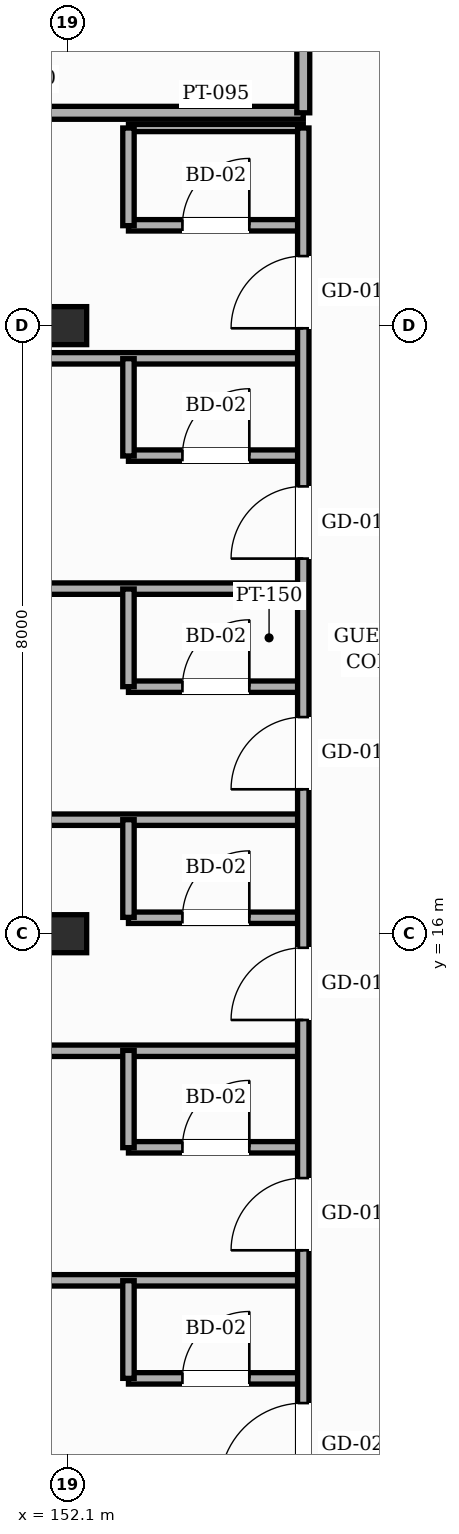
"""IFC4 building model, lengths in metres.
Left out: names, types, materials, properties, quantities, classifications, styles, units other than length and angle.
Written with IfcOpenShell. Run it as: python <this file> out.ifc"""

import sys

from ifc_helpers import new_model, si_unit, direction, frame, frame_2d, origin, origin_2d, place, context, subcontext, project, spatial, rectangle, hollow_rectangle, extrude, element, fill, save


model = new_model("IFC4")
c1 = context("Model", 3, precision=1e-05, world=origin(), true_north=direction((0.0, 1.0)))
c2 = subcontext(c1, "Body", "Model", "MODEL_VIEW")
j1 = project(units=[si_unit("LENGTHUNIT", "METRE"), si_unit("PLANEANGLEUNIT", "RADIAN")], contexts=[c1])
p1 = place(None, origin())
s1 = spatial("IfcSite", under=j1, at=p1, CompositionType="ELEMENT")
p2 = place(p1, origin())
s2 = spatial("IfcBuilding", under=s1, at=p2, CompositionType="ELEMENT")
p3 = place(p2, frame((0.0, 0.0, 39.0)))
s3 = spatial("IfcBuildingStorey", under=s2, at=p3, CompositionType="ELEMENT", Elevation=39.0)
for number, where, z_axis, x_axis in (
    (1, (152.1, 16.0, 0.0), (0.0, 0.0, 1.0), (1.0, 0.0, 0.0)),
    (2, (152.1, 24.0, 0.0), (0.0, 0.0, 1.0), (1.0, 0.0, 0.0)),
):
    element("IfcColumn", number, at=place(p3, frame(where, z_axis=z_axis, x_axis=x_axis)), inside=s3, PredefinedType="COLUMN", context=c2, shape_type="SweptSolid", body=[
        extrude(hollow_rectangle(XDim=0.5, YDim=0.5, WallThickness=0.022, InnerFilletRadius=0.022, OuterFilletRadius=0.044, at=origin_2d()), origin(), (0.0, 0.0, 1.0), 3.6),
    ])
p4 = place(p3, frame((152.9, 10.15, 0.0), z_axis=(0.0, 0.0, 1.0), x_axis=(1.0, 0.0, 0.0)))
e3 = element("IfcWall", 3, at=p4, inside=s3, PredefinedType="PARTITIONING", context=c2, shape_type="SweptSolid", body=[
    extrude(rectangle(XDim=2.3, YDim=0.15, at=frame_2d((1.15, 0.0))), origin(), (0.0, 0.0, 1.0), 3.365),
])
p5 = place(p4, frame((0.71, 0.0, 0.0)))
e4 = element("IfcOpeningElement", 4, at=p5, cuts=e3, PredefinedType="OPENING", context=c2, shape_type="SweptSolid", body=[
    extrude(rectangle(XDim=0.88, YDim=2.12, at=frame_2d((0.44, 1.06))), frame((0.0, 0.085, 0.0), z_axis=(0.0, -1.0, 0.0), x_axis=(1.0, 0.0, 0.0)), (0.0, 0.0, 1.0), 0.17),
])
p6 = place(p3, frame((144.2, 11.44, 0.0), z_axis=(0.0, 0.0, 1.0), x_axis=(1.0, 0.0, 0.0)))
e5 = element("IfcWall", 5, at=p6, inside=s3, PredefinedType="PARTITIONING", context=c2, shape_type="SweptSolid", body=[
    extrude(rectangle(XDim=11.0, YDim=0.15, at=frame_2d((5.5, 0.0))), origin(), (0.0, 0.0, 1.0), 3.365),
])
p7 = place(p3, frame((152.9, 13.19, 0.0), z_axis=(0.0, 0.0, 1.0), x_axis=(1.0, 0.0, 0.0)))
e6 = element("IfcWall", 6, at=p7, inside=s3, PredefinedType="PARTITIONING", context=c2, shape_type="SweptSolid", body=[
    extrude(rectangle(XDim=2.3, YDim=0.15, at=frame_2d((1.15, 0.0))), origin(), (0.0, 0.0, 1.0), 3.365),
])
p8 = place(p7, frame((0.71, 0.0, 0.0)))
e7 = element("IfcOpeningElement", 7, at=p8, cuts=e6, PredefinedType="OPENING", context=c2, shape_type="SweptSolid", body=[
    extrude(rectangle(XDim=0.88, YDim=2.12, at=frame_2d((0.44, 1.06))), frame((0.0, 0.085, 0.0), z_axis=(0.0, -1.0, 0.0), x_axis=(1.0, 0.0, 0.0)), (0.0, 0.0, 1.0), 0.17),
])
p9 = place(p3, frame((144.2, 14.46, 0.0), z_axis=(0.0, 0.0, 1.0), x_axis=(1.0, 0.0, 0.0)))
e8 = element("IfcWall", 8, at=p9, inside=s3, PredefinedType="PARTITIONING", context=c2, shape_type="SweptSolid", body=[
    extrude(rectangle(XDim=11.0, YDim=0.15, at=frame_2d((5.5, 0.0))), origin(), (0.0, 0.0, 1.0), 3.365),
])
p10 = place(p3, frame((152.9, 16.21, 0.0), z_axis=(0.0, 0.0, 1.0), x_axis=(1.0, 0.0, 0.0)))
e9 = element("IfcWall", 9, at=p10, inside=s3, PredefinedType="PARTITIONING", context=c2, shape_type="SweptSolid", body=[
    extrude(rectangle(XDim=2.3, YDim=0.15, at=frame_2d((1.15, 0.0))), origin(), (0.0, 0.0, 1.0), 2.755),
])
p11 = place(p10, frame((0.71, 0.0, 0.0)))
e10 = element("IfcOpeningElement", 10, at=p11, cuts=e9, PredefinedType="OPENING", context=c2, shape_type="SweptSolid", body=[
    extrude(rectangle(XDim=0.88, YDim=2.12, at=frame_2d((0.44, 1.06))), frame((0.0, 0.085, 0.0), z_axis=(0.0, -1.0, 0.0), x_axis=(1.0, 0.0, 0.0)), (0.0, 0.0, 1.0), 0.17),
])
p12 = place(p3, frame((144.2, 17.5, 0.0), z_axis=(0.0, 0.0, 1.0), x_axis=(1.0, 0.0, 0.0)))
e11 = element("IfcWall", 11, at=p12, inside=s3, PredefinedType="PARTITIONING", context=c2, shape_type="SweptSolid", body=[
    extrude(rectangle(XDim=11.0, YDim=0.15, at=frame_2d((5.5, 0.0))), origin(), (0.0, 0.0, 1.0), 3.365),
])
p13 = place(p3, frame((152.9, 19.25, 0.0), z_axis=(0.0, 0.0, 1.0), x_axis=(1.0, 0.0, 0.0)))
e12 = element("IfcWall", 12, at=p13, inside=s3, PredefinedType="PARTITIONING", context=c2, shape_type="SweptSolid", body=[
    extrude(rectangle(XDim=2.3, YDim=0.15, at=frame_2d((1.15, 0.0))), origin(), (0.0, 0.0, 1.0), 3.365),
])
p14 = place(p13, frame((0.71, 0.0, 0.0)))
e13 = element("IfcOpeningElement", 13, at=p14, cuts=e12, PredefinedType="OPENING", context=c2, shape_type="SweptSolid", body=[
    extrude(rectangle(XDim=0.88, YDim=2.12, at=frame_2d((0.44, 1.06))), frame((0.0, 0.085, 0.0), z_axis=(0.0, -1.0, 0.0), x_axis=(1.0, 0.0, 0.0)), (0.0, 0.0, 1.0), 0.17),
])
p15 = place(p3, frame((144.2, 20.54, 0.0), z_axis=(0.0, 0.0, 1.0), x_axis=(1.0, 0.0, 0.0)))
e14 = element("IfcWall", 14, at=p15, inside=s3, PredefinedType="PARTITIONING", context=c2, shape_type="SweptSolid", body=[
    extrude(rectangle(XDim=11.0, YDim=0.15, at=frame_2d((5.5, 0.0))), origin(), (0.0, 0.0, 1.0), 3.365),
])
p16 = place(p3, frame((152.9, 22.29, 0.0), z_axis=(0.0, 0.0, 1.0), x_axis=(1.0, 0.0, 0.0)))
e15 = element("IfcWall", 15, at=p16, inside=s3, PredefinedType="PARTITIONING", context=c2, shape_type="SweptSolid", body=[
    extrude(rectangle(XDim=2.3, YDim=0.15, at=frame_2d((1.15, 0.0))), origin(), (0.0, 0.0, 1.0), 3.365),
])
p17 = place(p16, frame((0.71, 0.0, 0.0)))
e16 = element("IfcOpeningElement", 16, at=p17, cuts=e15, PredefinedType="OPENING", context=c2, shape_type="SweptSolid", body=[
    extrude(rectangle(XDim=0.88, YDim=2.12, at=frame_2d((0.44, 1.06))), frame((0.0, 0.085, 0.0), z_axis=(0.0, -1.0, 0.0), x_axis=(1.0, 0.0, 0.0)), (0.0, 0.0, 1.0), 0.17),
])
p18 = place(p3, frame((144.2, 23.57, 0.0), z_axis=(0.0, 0.0, 1.0), x_axis=(1.0, 0.0, 0.0)))
e17 = element("IfcWall", 17, at=p18, inside=s3, PredefinedType="PARTITIONING", context=c2, shape_type="SweptSolid", body=[
    extrude(rectangle(XDim=11.0, YDim=0.15, at=frame_2d((5.5, 0.0))), origin(), (0.0, 0.0, 1.0), 3.365),
])
p19 = place(p3, frame((152.9, 25.32, 0.0), z_axis=(0.0, 0.0, 1.0), x_axis=(1.0, 0.0, 0.0)))
e18 = element("IfcWall", 18, at=p19, inside=s3, PredefinedType="PARTITIONING", context=c2, shape_type="SweptSolid", body=[
    extrude(rectangle(XDim=2.3, YDim=0.15, at=frame_2d((1.15, 0.0))), origin(), (0.0, 0.0, 1.0), 3.365),
])
p20 = place(p19, frame((0.71, 0.0, 0.0)))
e19 = element("IfcOpeningElement", 19, at=p20, cuts=e18, PredefinedType="OPENING", context=c2, shape_type="SweptSolid", body=[
    extrude(rectangle(XDim=0.88, YDim=2.12, at=frame_2d((0.44, 1.06))), frame((0.0, 0.085, 0.0), z_axis=(0.0, -1.0, 0.0), x_axis=(1.0, 0.0, 0.0)), (0.0, 0.0, 1.0), 0.17),
])
p21 = place(p3, frame((152.9, 26.6, 0.0), z_axis=(0.0, 0.0, 1.0), x_axis=(1.0, 0.0, 0.0)))
e20 = element("IfcWall", 20, at=p21, inside=s3, PredefinedType="PARTITIONING", context=c2, shape_type="SweptSolid", body=[
    extrude(rectangle(XDim=2.3, YDim=0.095, at=frame_2d((1.15, 0.0))), origin(), (0.0, 0.0, 1.0), 3.365),
])
p22 = place(p3, frame((147.8, 26.8, 0.0), z_axis=(0.0, 0.0, 1.0), x_axis=(1.0, 0.0, 0.0)))
e21 = element("IfcWall", 21, at=p22, inside=s3, PredefinedType="PARTITIONING", context=c2, shape_type="SweptSolid", body=[
    extrude(rectangle(XDim=7.4, YDim=0.17, at=frame_2d((3.7, 0.0))), origin(), (0.0, 0.0, 1.0), 3.365),
])
p23 = place(p3, frame((152.9, 10.15, 0.0), z_axis=(0.0, 0.0, 1.0), x_axis=(0.0, 1.0, 0.0)))
e22 = element("IfcWall", 22, at=p23, inside=s3, PredefinedType="PARTITIONING", context=c2, shape_type="SweptSolid", body=[
    extrude(rectangle(XDim=1.285, YDim=0.15, at=frame_2d((0.643, 0.0))), origin(), (0.0, 0.0, 1.0), 3.365),
])
p24 = place(p3, frame((152.9, 13.185, 0.0), z_axis=(0.0, 0.0, 1.0), x_axis=(0.0, 1.0, 0.0)))
e23 = element("IfcWall", 23, at=p24, inside=s3, PredefinedType="PARTITIONING", context=c2, shape_type="SweptSolid", body=[
    extrude(rectangle(XDim=1.28, YDim=0.15, at=frame_2d((0.64, 0.0))), origin(), (0.0, 0.0, 1.0), 3.365),
])
for number, where, z_axis, x_axis in (
    (24, (152.9, 16.215, 0.0), (0.0, 0.0, 1.0), (0.0, 1.0, 0.0)),
    (25, (152.9, 19.25, 0.0), (0.0, 0.0, 1.0), (0.0, 1.0, 0.0)),
):
    element("IfcWall", number, at=place(p3, frame(where, z_axis=z_axis, x_axis=x_axis)), inside=s3, PredefinedType="PARTITIONING", context=c2, shape_type="SweptSolid", body=[
        extrude(rectangle(XDim=1.285, YDim=0.15, at=frame_2d((0.643, 0.0))), origin(), (0.0, 0.0, 1.0), 3.365),
    ])
p25 = place(p3, frame((152.9, 22.285, 0.0), z_axis=(0.0, 0.0, 1.0), x_axis=(0.0, 1.0, 0.0)))
e26 = element("IfcWall", 26, at=p25, inside=s3, PredefinedType="PARTITIONING", context=c2, shape_type="SweptSolid", body=[
    extrude(rectangle(XDim=1.28, YDim=0.15, at=frame_2d((0.64, 0.0))), origin(), (0.0, 0.0, 1.0), 3.365),
])
p26 = place(p3, frame((152.9, 25.315, 0.0), z_axis=(0.0, 0.0, 1.0), x_axis=(0.0, 1.0, 0.0)))
e27 = element("IfcWall", 27, at=p26, inside=s3, PredefinedType="PARTITIONING", context=c2, shape_type="SweptSolid", body=[
    extrude(rectangle(XDim=1.285, YDim=0.15, at=frame_2d((0.643, 0.0))), origin(), (0.0, 0.0, 1.0), 3.365),
])
p27 = place(p3, frame((155.2, 8.4, 0.0), z_axis=(0.0, 0.0, 1.0), x_axis=(0.0, 1.0, 0.0)))
e28 = element("IfcWall", 28, at=p27, inside=s3, PredefinedType="PARTITIONING", context=c2, shape_type="SweptSolid", body=[
    extrude(rectangle(XDim=18.2, YDim=0.15, at=frame_2d((9.1, 0.0))), origin(), (0.0, 0.0, 1.0), 3.365),
])
p28 = place(p27, frame((0.325, 0.0, 0.0)))
e29 = element("IfcOpeningElement", 29, at=p28, cuts=e28, PredefinedType="OPENING", context=c2, shape_type="SweptSolid", body=[
    extrude(rectangle(XDim=1.1, YDim=2.2, at=frame_2d((0.55, 1.1))), frame((0.0, 0.085, 0.0), z_axis=(0.0, -1.0, 0.0), x_axis=(1.0, 0.0, 0.0)), (0.0, 0.0, 1.0), 0.17),
])
p29 = place(p27, frame((3.435, 0.0, 0.0)))
e30 = element("IfcOpeningElement", 30, at=p29, cuts=e28, PredefinedType="OPENING", context=c2, shape_type="SweptSolid", body=[
    extrude(rectangle(XDim=0.95, YDim=2.15, at=frame_2d((0.475, 1.075))), frame((0.0, 0.085, 0.0), z_axis=(0.0, -1.0, 0.0), x_axis=(1.0, 0.0, 0.0)), (0.0, 0.0, 1.0), 0.17),
])
p30 = place(p27, frame((6.465, 0.0, 0.0)))
e31 = element("IfcOpeningElement", 31, at=p30, cuts=e28, PredefinedType="OPENING", context=c2, shape_type="SweptSolid", body=[
    extrude(rectangle(XDim=0.95, YDim=2.15, at=frame_2d((0.475, 1.075))), frame((0.0, 0.085, 0.0), z_axis=(0.0, -1.0, 0.0), x_axis=(1.0, 0.0, 0.0)), (0.0, 0.0, 1.0), 0.17),
])
p31 = place(p27, frame((9.5, 0.0, 0.0)))
e32 = element("IfcOpeningElement", 32, at=p31, cuts=e28, PredefinedType="OPENING", context=c2, shape_type="SweptSolid", body=[
    extrude(rectangle(XDim=0.95, YDim=2.15, at=frame_2d((0.475, 1.075))), frame((0.0, 0.085, 0.0), z_axis=(0.0, -1.0, 0.0), x_axis=(1.0, 0.0, 0.0)), (0.0, 0.0, 1.0), 0.17),
])
p32 = place(p27, frame((12.535, 0.0, 0.0)))
e33 = element("IfcOpeningElement", 33, at=p32, cuts=e28, PredefinedType="OPENING", context=c2, shape_type="SweptSolid", body=[
    extrude(rectangle(XDim=0.95, YDim=2.15, at=frame_2d((0.475, 1.075))), frame((0.0, 0.085, 0.0), z_axis=(0.0, -1.0, 0.0), x_axis=(1.0, 0.0, 0.0)), (0.0, 0.0, 1.0), 0.17),
])
p33 = place(p27, frame((15.565, 0.0, 0.0)))
e34 = element("IfcOpeningElement", 34, at=p33, cuts=e28, PredefinedType="OPENING", context=c2, shape_type="SweptSolid", body=[
    extrude(rectangle(XDim=0.95, YDim=2.15, at=frame_2d((0.475, 1.075))), frame((0.0, 0.085, 0.0), z_axis=(0.0, -1.0, 0.0), x_axis=(1.0, 0.0, 0.0)), (0.0, 0.0, 1.0), 0.17),
])
p34 = place(p3, frame((155.2, 26.8, 0.0), z_axis=(0.0, 0.0, 1.0), x_axis=(0.0, 1.0, 0.0)))
e35 = element("IfcWall", 35, at=p34, inside=s3, PredefinedType="PARTITIONING", context=c2, shape_type="SweptSolid", body=[
    extrude(rectangle(XDim=3.4, YDim=0.17, at=frame_2d((1.7, 0.0))), origin(), (0.0, 0.0, 1.0), 3.365),
])
p35 = place(p34, frame((1.1, 0.0, 0.0)))
e36 = element("IfcOpeningElement", 36, at=p35, cuts=e35, PredefinedType="OPENING", context=c2, shape_type="SweptSolid", body=[
    extrude(rectangle(XDim=1.2, YDim=2.2, at=frame_2d((0.6, 1.1))), frame((0.0, 0.095, 0.0), z_axis=(0.0, -1.0, 0.0), x_axis=(1.0, 0.0, 0.0)), (0.0, 0.0, 1.0), 0.19),
])
p36 = place(p28, origin())
e37 = element("IfcDoor", 37, at=p36, inside=s3, OperationType="SINGLE_SWING_LEFT", PredefinedType="DOOR", context=c2, shape_type="SweptSolid", body=[
    extrude(rectangle(XDim=1.1, YDim=2.2, at=frame_2d((0.55, 1.1))), frame((0.0, 0.025, 0.0), z_axis=(0.0, -1.0, 0.0), x_axis=(1.0, 0.0, 0.0)), (0.0, 0.0, 1.0), 0.05),
])
fill(e29, e37)
p37 = place(p5, origin())
e38 = element("IfcDoor", 38, at=p37, inside=s3, OperationType="SINGLE_SWING_RIGHT", PredefinedType="DOOR", context=c2, shape_type="SweptSolid", body=[
    extrude(rectangle(XDim=0.88, YDim=2.12, at=frame_2d((0.44, 1.06))), frame((0.0, 0.025, 0.0), z_axis=(0.0, -1.0, 0.0), x_axis=(1.0, 0.0, 0.0)), (0.0, 0.0, 1.0), 0.05),
])
fill(e4, e38)
p38 = place(p29, origin())
e39 = element("IfcDoor", 39, at=p38, inside=s3, OperationType="SINGLE_SWING_LEFT", PredefinedType="DOOR", context=c2, shape_type="SweptSolid", body=[
    extrude(rectangle(XDim=0.95, YDim=2.15, at=frame_2d((0.475, 1.075))), frame((0.0, 0.025, 0.0), z_axis=(0.0, -1.0, 0.0), x_axis=(1.0, 0.0, 0.0)), (0.0, 0.0, 1.0), 0.05),
])
fill(e30, e39)
p39 = place(p8, origin())
e40 = element("IfcDoor", 40, at=p39, inside=s3, OperationType="SINGLE_SWING_RIGHT", PredefinedType="DOOR", context=c2, shape_type="SweptSolid", body=[
    extrude(rectangle(XDim=0.88, YDim=2.12, at=frame_2d((0.44, 1.06))), frame((0.0, 0.025, 0.0), z_axis=(0.0, -1.0, 0.0), x_axis=(1.0, 0.0, 0.0)), (0.0, 0.0, 1.0), 0.05),
])
fill(e7, e40)
p40 = place(p30, origin())
e41 = element("IfcDoor", 41, at=p40, inside=s3, OperationType="SINGLE_SWING_LEFT", PredefinedType="DOOR", context=c2, shape_type="SweptSolid", body=[
    extrude(rectangle(XDim=0.95, YDim=2.15, at=frame_2d((0.475, 1.075))), frame((0.0, 0.025, 0.0), z_axis=(0.0, -1.0, 0.0), x_axis=(1.0, 0.0, 0.0)), (0.0, 0.0, 1.0), 0.05),
])
fill(e31, e41)
p41 = place(p11, origin())
e42 = element("IfcDoor", 42, at=p41, inside=s3, OperationType="SINGLE_SWING_RIGHT", PredefinedType="DOOR", context=c2, shape_type="SweptSolid", body=[
    extrude(rectangle(XDim=0.88, YDim=2.12, at=frame_2d((0.44, 1.06))), frame((0.0, 0.025, 0.0), z_axis=(0.0, -1.0, 0.0), x_axis=(1.0, 0.0, 0.0)), (0.0, 0.0, 1.0), 0.05),
])
fill(e10, e42)
p42 = place(p31, origin())
e43 = element("IfcDoor", 43, at=p42, inside=s3, OperationType="SINGLE_SWING_LEFT", PredefinedType="DOOR", context=c2, shape_type="SweptSolid", body=[
    extrude(rectangle(XDim=0.95, YDim=2.15, at=frame_2d((0.475, 1.075))), frame((0.0, 0.025, 0.0), z_axis=(0.0, -1.0, 0.0), x_axis=(1.0, 0.0, 0.0)), (0.0, 0.0, 1.0), 0.05),
])
fill(e32, e43)
p43 = place(p14, origin())
e44 = element("IfcDoor", 44, at=p43, inside=s3, OperationType="SINGLE_SWING_RIGHT", PredefinedType="DOOR", context=c2, shape_type="SweptSolid", body=[
    extrude(rectangle(XDim=0.88, YDim=2.12, at=frame_2d((0.44, 1.06))), frame((0.0, 0.025, 0.0), z_axis=(0.0, -1.0, 0.0), x_axis=(1.0, 0.0, 0.0)), (0.0, 0.0, 1.0), 0.05),
])
fill(e13, e44)
p44 = place(p32, origin())
e45 = element("IfcDoor", 45, at=p44, inside=s3, OperationType="SINGLE_SWING_LEFT", PredefinedType="DOOR", context=c2, shape_type="SweptSolid", body=[
    extrude(rectangle(XDim=0.95, YDim=2.15, at=frame_2d((0.475, 1.075))), frame((0.0, 0.025, 0.0), z_axis=(0.0, -1.0, 0.0), x_axis=(1.0, 0.0, 0.0)), (0.0, 0.0, 1.0), 0.05),
])
fill(e33, e45)
p45 = place(p17, origin())
e46 = element("IfcDoor", 46, at=p45, inside=s3, OperationType="SINGLE_SWING_RIGHT", PredefinedType="DOOR", context=c2, shape_type="SweptSolid", body=[
    extrude(rectangle(XDim=0.88, YDim=2.12, at=frame_2d((0.44, 1.06))), frame((0.0, 0.025, 0.0), z_axis=(0.0, -1.0, 0.0), x_axis=(1.0, 0.0, 0.0)), (0.0, 0.0, 1.0), 0.05),
])
fill(e16, e46)
p46 = place(p33, origin())
e47 = element("IfcDoor", 47, at=p46, inside=s3, OperationType="SINGLE_SWING_LEFT", PredefinedType="DOOR", context=c2, shape_type="SweptSolid", body=[
    extrude(rectangle(XDim=0.95, YDim=2.15, at=frame_2d((0.475, 1.075))), frame((0.0, 0.025, 0.0), z_axis=(0.0, -1.0, 0.0), x_axis=(1.0, 0.0, 0.0)), (0.0, 0.0, 1.0), 0.05),
])
fill(e34, e47)
p47 = place(p20, origin())
e48 = element("IfcDoor", 48, at=p47, inside=s3, OperationType="SINGLE_SWING_RIGHT", PredefinedType="DOOR", context=c2, shape_type="SweptSolid", body=[
    extrude(rectangle(XDim=0.88, YDim=2.12, at=frame_2d((0.44, 1.06))), frame((0.0, 0.025, 0.0), z_axis=(0.0, -1.0, 0.0), x_axis=(1.0, 0.0, 0.0)), (0.0, 0.0, 1.0), 0.05),
])
fill(e19, e48)
save(model, sys.argv[1])
